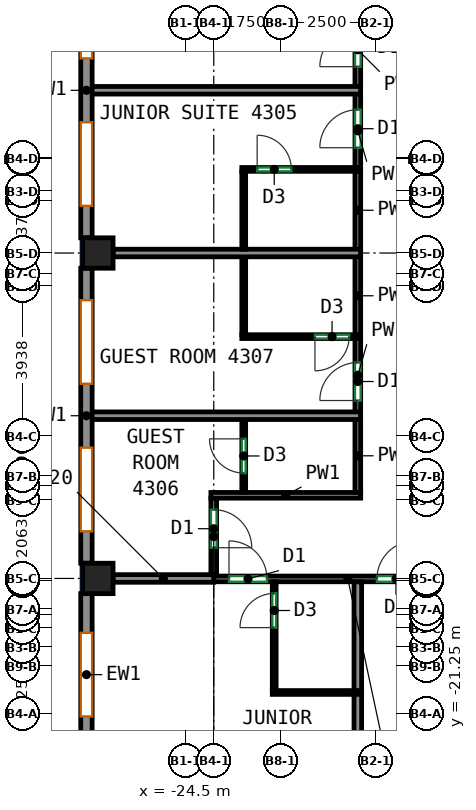
"""IFC4 building model, lengths in metres.
Left out: names, types, materials, properties, quantities, classifications, styles, units other than length and angle.
Written with IfcOpenShell. Run it as: python <this file> out.ifc"""

import sys

from ifc_helpers import new_model, si_unit, direction, frame, frame_2d, origin, origin_2d, place, context, subcontext, project, spatial, rectangle, extrude, source, transform, mapped, element, fill, save


model = new_model("IFC4")
c1 = context("Model", 3, precision=1e-05, world=origin(), true_north=direction((0.0, 1.0)))
c2 = subcontext(c1, "Body", "Model", "MODEL_VIEW")
j1 = project(units=[si_unit("LENGTHUNIT", "METRE"), si_unit("PLANEANGLEUNIT", "RADIAN")], contexts=[c1])
p1 = place(None, origin())
s1 = spatial("IfcSite", under=j1, at=p1, CompositionType="ELEMENT")
p2 = place(p1, origin())
s2 = spatial("IfcBuilding", under=s1, at=p2, CompositionType="ELEMENT")
p3 = place(p2, frame((0.0, 0.0, 182.1)))
s3 = spatial("IfcBuildingStorey", under=s2, at=p3, CompositionType="ELEMENT", Elevation=182.1)
m1 = source(origin(), c2, "Body", "SweptSolid", [
    extrude(rectangle(XDim=0.8, YDim=0.8, at=origin_2d()), origin(), (0.0, 0.0, 1.0), 3.12),
])
for number, where, z_axis, x_axis in (
    (1, (-26.8, -17.688, 0.0), (0.0, 0.0, 1.0), (1.0, 0.0, 0.0)),
    (2, (-26.8, -9.125, 0.0), (0.0, 0.0, 1.0), (1.0, 0.0, 0.0)),
):
    element("IfcColumn", number, at=place(p3, frame(where, z_axis=z_axis, x_axis=x_axis)), inside=s3, PredefinedType="COLUMN", context=c2, shape_type="MappedRepresentation", body=[
        mapped(m1, transform((0.0, 0.0, 0.0))),
    ])
m2 = source(origin(), c2, "Body", "SweptSolid", [
    extrude(rectangle(XDim=7.763, YDim=0.3, at=frame_2d((3.881, 0.0))), origin(), (0.0, 0.0, 1.0), 3.12),
])
p4 = place(p3, frame((-27.1, -0.962, 0.0), z_axis=(0.0, 0.0, 1.0), x_axis=(0.0, -1.0, 0.0)))
e3 = element("IfcWall", 3, at=p4, inside=s3, PredefinedType="SOLIDWALL", context=c2, shape_type="MappedRepresentation", body=[
    mapped(m2, transform((0.0, 0.0, 0.0))),
])
p5 = place(p4, frame((0.841, 0.0, 0.85)))
e4 = element("IfcOpeningElement", 4, at=p5, cuts=e3, PredefinedType="OPENING", context=c2, shape_type="SweptSolid", body=[
    extrude(rectangle(XDim=2.2, YDim=1.95, at=frame_2d((1.1, 0.975))), frame((0.0, 0.16, 0.0), z_axis=(0.0, -1.0, 0.0), x_axis=(1.0, 0.0, 0.0)), (0.0, 0.0, 1.0), 0.32),
])
p6 = place(p4, frame((4.722, 0.0, 0.85)))
e5 = element("IfcOpeningElement", 5, at=p6, cuts=e3, PredefinedType="OPENING", context=c2, shape_type="SweptSolid", body=[
    extrude(rectangle(XDim=2.2, YDim=1.95, at=frame_2d((1.1, 0.975))), frame((0.0, 0.16, 0.0), z_axis=(0.0, -1.0, 0.0), x_axis=(1.0, 0.0, 0.0)), (0.0, 0.0, 1.0), 0.32),
])
p7 = place(p3, frame((-27.1, -9.525, 0.0), z_axis=(0.0, 0.0, 1.0), x_axis=(0.0, -1.0, 0.0)))
e6 = element("IfcWall", 6, at=p7, inside=s3, PredefinedType="SOLIDWALL", context=c2, shape_type="MappedRepresentation", body=[
    mapped(m2, transform((0.0, 0.0, 0.0))),
])
p8 = place(p7, frame((0.841, 0.0, 0.85)))
e7 = element("IfcOpeningElement", 7, at=p8, cuts=e6, PredefinedType="OPENING", context=c2, shape_type="SweptSolid", body=[
    extrude(rectangle(XDim=2.2, YDim=1.95, at=frame_2d((1.1, 0.975))), frame((0.0, 0.16, 0.0), z_axis=(0.0, -1.0, 0.0), x_axis=(1.0, 0.0, 0.0)), (0.0, 0.0, 1.0), 0.32),
])
p9 = place(p7, frame((4.722, 0.0, 0.85)))
e8 = element("IfcOpeningElement", 8, at=p9, cuts=e6, PredefinedType="OPENING", context=c2, shape_type="SweptSolid", body=[
    extrude(rectangle(XDim=2.2, YDim=1.95, at=frame_2d((1.1, 0.975))), frame((0.0, 0.16, 0.0), z_axis=(0.0, -1.0, 0.0), x_axis=(1.0, 0.0, 0.0)), (0.0, 0.0, 1.0), 0.32),
])
m3 = source(origin(), c2, "Body", "SweptSolid", [
    extrude(rectangle(XDim=4.263, YDim=0.3, at=frame_2d((2.131, 0.0))), origin(), (0.0, 0.0, 1.0), 3.12),
])
p10 = place(p3, frame((-27.1, -18.087, 0.0), z_axis=(0.0, 0.0, 1.0), x_axis=(0.0, -1.0, 0.0)))
e9 = element("IfcWall", 9, at=p10, inside=s3, PredefinedType="SOLIDWALL", context=c2, shape_type="MappedRepresentation", body=[
    mapped(m3, transform((0.0, 0.0, 0.0))),
])
p11 = place(p10, frame((1.031, 0.0, 0.85)))
e10 = element("IfcOpeningElement", 10, at=p11, cuts=e9, PredefinedType="OPENING", context=c2, shape_type="SweptSolid", body=[
    extrude(rectangle(XDim=2.2, YDim=1.95, at=frame_2d((1.1, 0.975))), frame((0.0, 0.16, 0.0), z_axis=(0.0, -1.0, 0.0), x_axis=(1.0, 0.0, 0.0)), (0.0, 0.0, 1.0), 0.32),
])
p12 = place(p3, frame((-23.75, -17.7, 0.0), z_axis=(0.0, 0.0, 1.0), x_axis=(1.0, 0.0, 0.0)))
e11 = element("IfcWall", 11, at=p12, inside=s3, PredefinedType="PARTITIONING", context=c2, shape_type="SweptSolid", body=[
    extrude(rectangle(XDim=7.058, YDim=0.15, at=frame_2d((3.529, 0.0))), origin(), (0.0, 0.0, 1.0), 2.52),
])
p13 = place(p12, frame((0.401, 0.0, 0.0)))
e12 = element("IfcOpeningElement", 12, at=p13, cuts=e11, PredefinedType="OPENING", context=c2, shape_type="SweptSolid", body=[
    extrude(rectangle(XDim=1.0, YDim=2.1, at=frame_2d((0.5, 1.05))), frame((0.0, 0.085, 0.0), z_axis=(0.0, -1.0, 0.0), x_axis=(1.0, 0.0, 0.0)), (0.0, 0.0, 1.0), 0.17),
])
p14 = place(p12, frame((4.294, 0.0, 0.0)))
e13 = element("IfcOpeningElement", 13, at=p14, cuts=e11, PredefinedType="OPENING", context=c2, shape_type="SweptSolid", body=[
    extrude(rectangle(XDim=1.0, YDim=2.1, at=frame_2d((0.5, 1.05))), frame((0.0, 0.085, 0.0), z_axis=(0.0, -1.0, 0.0), x_axis=(1.0, 0.0, 0.0)), (0.0, 0.0, 1.0), 0.17),
])
p15 = place(p3, frame((-23.75, -15.575, 0.0), z_axis=(0.0, 0.0, 1.0), x_axis=(0.0, -1.0, 0.0)))
e14 = element("IfcWall", 14, at=p15, inside=s3, PredefinedType="PARTITIONING", context=c2, shape_type="SweptSolid", body=[
    extrude(rectangle(XDim=2.023, YDim=0.15, at=frame_2d((1.011, 0.0))), origin(), (0.0, 0.0, 1.0), 2.52),
])
p16 = place(p15, frame((0.304, 0.0, 0.0)))
e15 = element("IfcOpeningElement", 15, at=p16, cuts=e14, PredefinedType="OPENING", context=c2, shape_type="SweptSolid", body=[
    extrude(rectangle(XDim=1.0, YDim=2.1, at=frame_2d((0.5, 1.05))), frame((0.0, 0.085, 0.0), z_axis=(0.0, -1.0, 0.0), x_axis=(1.0, 0.0, 0.0)), (0.0, 0.0, 1.0), 0.17),
])
p17 = place(p3, frame((-23.825, -15.5, 0.0), z_axis=(0.0, 0.0, 1.0), x_axis=(1.0, 0.0, 0.0)))
e16 = element("IfcWall", 16, at=p17, inside=s3, PredefinedType="PARTITIONING", context=c2, shape_type="SweptSolid", body=[
    extrude(rectangle(XDim=3.941, YDim=0.15, at=frame_2d((1.97, 0.0))), origin(), (0.0, 0.0, 1.0), 3.12),
])
p18 = place(p3, frame((-19.959, -15.425, 0.0), z_axis=(0.0, 0.0, 1.0), x_axis=(0.0, 1.0, 0.0)))
e17 = element("IfcWall", 17, at=p18, inside=s3, PredefinedType="PARTITIONING", context=c2, shape_type="SweptSolid", body=[
    extrude(rectangle(XDim=1.929, YDim=0.15, at=frame_2d((0.964, 0.0))), origin(), (0.0, 0.0, 1.0), 3.12),
])
p19 = place(p3, frame((-19.959, -13.316, 0.0), z_axis=(0.0, 0.0, 1.0), x_axis=(0.0, 1.0, 0.0)))
e18 = element("IfcWall", 18, at=p19, inside=s3, PredefinedType="PARTITIONING", context=c2, shape_type="SweptSolid", body=[
    extrude(rectangle(XDim=1.951, YDim=0.15, at=frame_2d((0.976, 0.0))), origin(), (0.0, 0.0, 1.0), 3.12),
])
p20 = place(p19, frame((0.31, 0.0, 0.0)))
e19 = element("IfcOpeningElement", 19, at=p20, cuts=e18, PredefinedType="OPENING", context=c2, shape_type="SweptSolid", body=[
    extrude(rectangle(XDim=1.0, YDim=2.1, at=frame_2d((0.5, 1.05))), frame((0.0, 0.085, 0.0), z_axis=(0.0, -1.0, 0.0), x_axis=(1.0, 0.0, 0.0)), (0.0, 0.0, 1.0), 0.17),
])
p21 = place(p3, frame((-19.959, -11.285, 0.0), z_axis=(0.0, 0.0, 1.0), x_axis=(0.0, 1.0, 0.0)))
e20 = element("IfcWall", 20, at=p21, inside=s3, PredefinedType="PARTITIONING", context=c2, shape_type="SweptSolid", body=[
    extrude(rectangle(XDim=2.07, YDim=0.15, at=frame_2d((1.035, 0.0))), origin(), (0.0, 0.0, 1.0), 3.12),
])
p22 = place(p3, frame((-19.959, -6.885, 0.0), z_axis=(0.0, 0.0, 1.0), x_axis=(0.0, 1.0, 0.0)))
e21 = element("IfcWall", 21, at=p22, inside=s3, PredefinedType="PARTITIONING", context=c2, shape_type="SweptSolid", body=[
    extrude(rectangle(XDim=1.952, YDim=0.15, at=frame_2d((0.976, 0.0))), origin(), (0.0, 0.0, 1.0), 3.12),
])
p23 = place(p22, frame((0.531, 0.0, 0.0)))
e22 = element("IfcOpeningElement", 22, at=p23, cuts=e21, PredefinedType="OPENING", context=c2, shape_type="SweptSolid", body=[
    extrude(rectangle(XDim=1.0, YDim=2.1, at=frame_2d((0.5, 1.05))), frame((0.0, 0.085, 0.0), z_axis=(0.0, -1.0, 0.0), x_axis=(1.0, 0.0, 0.0)), (0.0, 0.0, 1.0), 0.17),
])
p24 = place(p3, frame((-19.959, -9.035, 0.0), z_axis=(0.0, 0.0, 1.0), x_axis=(0.0, 1.0, 0.0)))
e23 = element("IfcWall", 23, at=p24, inside=s3, PredefinedType="PARTITIONING", context=c2, shape_type="SweptSolid", body=[
    extrude(rectangle(XDim=2.07, YDim=0.15, at=frame_2d((1.035, 0.0))), origin(), (0.0, 0.0, 1.0), 3.12),
])
p25 = place(p3, frame((-19.959, -4.753, 0.0), z_axis=(0.0, 0.0, 1.0), x_axis=(0.0, 1.0, 0.0)))
e24 = element("IfcWall", 24, at=p25, inside=s3, PredefinedType="PARTITIONING", context=c2, shape_type="SweptSolid", body=[
    extrude(rectangle(XDim=1.951, YDim=0.15, at=frame_2d((0.976, 0.0))), origin(), (0.0, 0.0, 1.0), 3.12),
])
p26 = place(p25, frame((0.531, 0.0, 0.0)))
e25 = element("IfcOpeningElement", 25, at=p26, cuts=e24, PredefinedType="OPENING", context=c2, shape_type="SweptSolid", body=[
    extrude(rectangle(XDim=1.0, YDim=2.1, at=frame_2d((0.5, 1.05))), frame((0.0, 0.085, 0.0), z_axis=(0.0, -1.0, 0.0), x_axis=(1.0, 0.0, 0.0)), (0.0, 0.0, 1.0), 0.17),
])
p27 = place(p3, frame((-22.159, -20.638, 0.0), z_axis=(0.0, 0.0, 1.0), x_axis=(0.0, 1.0, 0.0)))
e26 = element("IfcWall", 26, at=p27, inside=s3, PredefinedType="PARTITIONING", context=c2, shape_type="SweptSolid", body=[
    extrude(rectangle(XDim=2.861, YDim=0.1, at=frame_2d((1.43, 0.0))), origin(), (0.0, 0.0, 1.0), 3.12),
])
p28 = place(p27, frame((1.657, 0.0, 0.0)))
e27 = element("IfcOpeningElement", 27, at=p28, cuts=e26, PredefinedType="OPENING", context=c2, shape_type="SweptSolid", body=[
    extrude(rectangle(XDim=0.9, YDim=2.1, at=frame_2d((0.45, 1.05))), frame((0.0, 0.06, 0.0), z_axis=(0.0, -1.0, 0.0), x_axis=(1.0, 0.0, 0.0)), (0.0, 0.0, 1.0), 0.12),
])
p29 = place(p3, frame((-22.209, -20.688, 0.0), z_axis=(0.0, 0.0, 1.0), x_axis=(1.0, 0.0, 0.0)))
e28 = element("IfcWall", 28, at=p29, inside=s3, PredefinedType="PARTITIONING", context=c2, shape_type="SweptSolid", body=[
    extrude(rectangle(XDim=2.35, YDim=0.1, at=frame_2d((1.175, 0.0))), origin(), (0.0, 0.0, 1.0), 3.12),
])
p30 = place(p3, frame((-19.959, -26.0, 0.0), z_axis=(0.0, 0.0, 1.0), x_axis=(0.0, 1.0, 0.0)))
e29 = element("IfcWall", 29, at=p30, inside=s3, PredefinedType="PARTITIONING", context=c2, shape_type="SweptSolid", body=[
    extrude(rectangle(XDim=5.262, YDim=0.2, at=frame_2d((2.631, 0.0))), origin(), (0.0, 0.0, 1.0), 3.12),
])
p31 = place(p3, frame((-26.4, -17.688, 0.0), z_axis=(0.0, 0.0, 1.0), x_axis=(1.0, 0.0, 0.0)))
e30 = element("IfcWall", 30, at=p31, inside=s3, PredefinedType="PARTITIONING", context=c2, shape_type="SweptSolid", body=[
    extrude(rectangle(XDim=2.648, YDim=0.2, at=frame_2d((1.324, 0.0))), origin(), (0.0, 0.0, 1.0), 2.52),
])
p32 = place(p3, frame((-19.959, -20.638, 0.0), z_axis=(0.0, 0.0, 1.0), x_axis=(0.0, 1.0, 0.0)))
e31 = element("IfcWall", 31, at=p32, inside=s3, PredefinedType="PARTITIONING", context=c2, shape_type="SweptSolid", body=[
    extrude(rectangle(XDim=2.861, YDim=0.2, at=frame_2d((1.43, 0.0))), origin(), (0.0, 0.0, 1.0), 3.12),
])
p33 = place(p3, frame((-22.961, -15.423, 0.0), z_axis=(0.0, 0.0, 1.0), x_axis=(0.0, 1.0, 0.0)))
e32 = element("IfcWall", 32, at=p33, inside=s3, PredefinedType="PARTITIONING", context=c2, shape_type="SweptSolid", body=[
    extrude(rectangle(XDim=1.917, YDim=0.1, at=frame_2d((0.958, 0.0))), origin(), (0.0, 0.0, 1.0), 3.12),
])
p34 = place(p33, frame((0.508, 0.0, 0.0)))
e33 = element("IfcOpeningElement", 33, at=p34, cuts=e32, PredefinedType="OPENING", context=c2, shape_type="SweptSolid", body=[
    extrude(rectangle(XDim=0.9, YDim=2.1, at=frame_2d((0.45, 1.05))), frame((0.0, 0.06, 0.0), z_axis=(0.0, -1.0, 0.0), x_axis=(1.0, 0.0, 0.0)), (0.0, 0.0, 1.0), 0.12),
])
p35 = place(p3, frame((-27.0, -13.406, 0.0), z_axis=(0.0, 0.0, 1.0), x_axis=(1.0, 0.0, 0.0)))
e34 = element("IfcWall", 34, at=p35, inside=s3, PredefinedType="PARTITIONING", context=c2, shape_type="SweptSolid", body=[
    extrude(rectangle(XDim=7.114, YDim=0.2, at=frame_2d((3.557, 0.0))), origin(), (0.0, 0.0, 1.0), 3.12),
])
p36 = place(p3, frame((-19.886, -11.325, 0.0), z_axis=(0.0, 0.0, 1.0), x_axis=(-1.0, 0.0, 0.0)))
e35 = element("IfcWall", 35, at=p36, inside=s3, PredefinedType="PARTITIONING", context=c2, shape_type="SweptSolid", body=[
    extrude(rectangle(XDim=3.125, YDim=0.1, at=frame_2d((1.562, 0.0))), origin(), (0.0, 0.0, 1.0), 3.12),
])
p37 = place(p36, frame((0.301, 0.0, 0.0)))
e36 = element("IfcOpeningElement", 36, at=p37, cuts=e35, PredefinedType="OPENING", context=c2, shape_type="SweptSolid", body=[
    extrude(rectangle(XDim=0.9, YDim=2.1, at=frame_2d((0.45, 1.05))), frame((0.0, 0.06, 0.0), z_axis=(0.0, -1.0, 0.0), x_axis=(1.0, 0.0, 0.0)), (0.0, 0.0, 1.0), 0.12),
])
p38 = place(p3, frame((-22.961, -11.275, 0.0), z_axis=(0.0, 0.0, 1.0), x_axis=(0.0, 1.0, 0.0)))
e37 = element("IfcWall", 37, at=p38, inside=s3, PredefinedType="PARTITIONING", context=c2, shape_type="SweptSolid", body=[
    extrude(rectangle(XDim=2.05, YDim=0.1, at=frame_2d((1.025, 0.0))), origin(), (0.0, 0.0, 1.0), 3.12),
])
p39 = place(p3, frame((-26.4, -9.125, 0.0), z_axis=(0.0, 0.0, 1.0), x_axis=(1.0, 0.0, 0.0)))
e38 = element("IfcWall", 38, at=p39, inside=s3, PredefinedType="PARTITIONING", context=c2, shape_type="SweptSolid", body=[
    extrude(rectangle(XDim=6.514, YDim=0.2, at=frame_2d((3.257, 0.0))), origin(), (0.0, 0.0, 1.0), 3.12),
])
p40 = place(p3, frame((-23.011, -6.925, 0.0), z_axis=(0.0, 0.0, 1.0), x_axis=(1.0, 0.0, 0.0)))
e39 = element("IfcWall", 39, at=p40, inside=s3, PredefinedType="PARTITIONING", context=c2, shape_type="SweptSolid", body=[
    extrude(rectangle(XDim=3.125, YDim=0.1, at=frame_2d((1.562, 0.0))), origin(), (0.0, 0.0, 1.0), 3.12),
])
p41 = place(p40, frame((0.403, 0.0, 0.0)))
e40 = element("IfcOpeningElement", 40, at=p41, cuts=e39, PredefinedType="OPENING", context=c2, shape_type="SweptSolid", body=[
    extrude(rectangle(XDim=0.9, YDim=2.1, at=frame_2d((0.45, 1.05))), frame((0.0, 0.06, 0.0), z_axis=(0.0, -1.0, 0.0), x_axis=(1.0, 0.0, 0.0)), (0.0, 0.0, 1.0), 0.12),
])
p42 = place(p3, frame((-22.961, -9.025, 0.0), z_axis=(0.0, 0.0, 1.0), x_axis=(0.0, 1.0, 0.0)))
e41 = element("IfcWall", 41, at=p42, inside=s3, PredefinedType="PARTITIONING", context=c2, shape_type="SweptSolid", body=[
    extrude(rectangle(XDim=2.05, YDim=0.1, at=frame_2d((1.025, 0.0))), origin(), (0.0, 0.0, 1.0), 3.12),
])
p43 = place(p3, frame((-27.0, -4.843, 0.0), z_axis=(0.0, 0.0, 1.0), x_axis=(1.0, 0.0, 0.0)))
e42 = element("IfcWall", 42, at=p43, inside=s3, PredefinedType="PARTITIONING", context=c2, shape_type="SweptSolid", body=[
    extrude(rectangle(XDim=7.114, YDim=0.2, at=frame_2d((3.557, 0.0))), origin(), (0.0, 0.0, 1.0), 3.12),
])
p44 = place(p5, origin())
e43 = element("IfcWindow", 43, at=p44, inside=s3, PartitioningType="SINGLE_PANEL", PredefinedType="WINDOW", context=c2, shape_type="SweptSolid", body=[
    extrude(rectangle(XDim=2.2, YDim=1.95, at=frame_2d((1.1, 0.975))), frame((0.0, 0.03, 0.0), z_axis=(0.0, -1.0, 0.0), x_axis=(1.0, 0.0, 0.0)), (0.0, 0.0, 1.0), 0.06),
])
fill(e4, e43)
p45 = place(p6, origin())
e44 = element("IfcWindow", 44, at=p45, inside=s3, PartitioningType="SINGLE_PANEL", PredefinedType="WINDOW", context=c2, shape_type="SweptSolid", body=[
    extrude(rectangle(XDim=2.2, YDim=1.95, at=frame_2d((1.1, 0.975))), frame((0.0, 0.03, 0.0), z_axis=(0.0, -1.0, 0.0), x_axis=(1.0, 0.0, 0.0)), (0.0, 0.0, 1.0), 0.06),
])
fill(e5, e44)
p46 = place(p8, origin())
e45 = element("IfcWindow", 45, at=p46, inside=s3, PartitioningType="SINGLE_PANEL", PredefinedType="WINDOW", context=c2, shape_type="SweptSolid", body=[
    extrude(rectangle(XDim=2.2, YDim=1.95, at=frame_2d((1.1, 0.975))), frame((0.0, 0.03, 0.0), z_axis=(0.0, -1.0, 0.0), x_axis=(1.0, 0.0, 0.0)), (0.0, 0.0, 1.0), 0.06),
])
fill(e7, e45)
p47 = place(p9, origin())
e46 = element("IfcWindow", 46, at=p47, inside=s3, PartitioningType="SINGLE_PANEL", PredefinedType="WINDOW", context=c2, shape_type="SweptSolid", body=[
    extrude(rectangle(XDim=2.2, YDim=1.95, at=frame_2d((1.1, 0.975))), frame((0.0, 0.03, 0.0), z_axis=(0.0, -1.0, 0.0), x_axis=(1.0, 0.0, 0.0)), (0.0, 0.0, 1.0), 0.06),
])
fill(e8, e46)
p48 = place(p11, origin())
e47 = element("IfcWindow", 47, at=p48, inside=s3, PartitioningType="SINGLE_PANEL", PredefinedType="WINDOW", context=c2, shape_type="SweptSolid", body=[
    extrude(rectangle(XDim=2.2, YDim=1.95, at=frame_2d((1.1, 0.975))), frame((0.0, 0.03, 0.0), z_axis=(0.0, -1.0, 0.0), x_axis=(1.0, 0.0, 0.0)), (0.0, 0.0, 1.0), 0.06),
])
fill(e10, e47)
p49 = place(p28, origin())
e48 = element("IfcDoor", 48, at=p49, inside=s3, OperationType="SINGLE_SWING_LEFT", PredefinedType="DOOR", context=c2, shape_type="SweptSolid", body=[
    extrude(rectangle(XDim=0.9, YDim=2.1, at=frame_2d((0.45, 1.05))), frame((0.0, 0.025, 0.0), z_axis=(0.0, -1.0, 0.0), x_axis=(1.0, 0.0, 0.0)), (0.0, 0.0, 1.0), 0.05),
])
fill(e27, e48)
p50 = place(p13, origin())
e49 = element("IfcDoor", 49, at=p50, inside=s3, OperationType="SINGLE_SWING_LEFT", PredefinedType="DOOR", context=c2, shape_type="SweptSolid", body=[
    extrude(rectangle(XDim=1.0, YDim=2.1, at=frame_2d((0.5, 1.05))), frame((0.0, 0.025, 0.0), z_axis=(0.0, -1.0, 0.0), x_axis=(1.0, 0.0, 0.0)), (0.0, 0.0, 1.0), 0.05),
])
fill(e12, e49)
p51 = place(p14, origin())
e50 = element("IfcDoor", 50, at=p51, inside=s3, OperationType="SINGLE_SWING_RIGHT", PredefinedType="DOOR", context=c2, shape_type="SweptSolid", body=[
    extrude(rectangle(XDim=1.0, YDim=2.1, at=frame_2d((0.5, 1.05))), frame((0.0, 0.025, 0.0), z_axis=(0.0, -1.0, 0.0), x_axis=(1.0, 0.0, 0.0)), (0.0, 0.0, 1.0), 0.05),
])
fill(e13, e50)
p52 = place(p16, origin())
e51 = element("IfcDoor", 51, at=p52, inside=s3, OperationType="SINGLE_SWING_RIGHT", PredefinedType="DOOR", context=c2, shape_type="SweptSolid", body=[
    extrude(rectangle(XDim=1.0, YDim=2.1, at=frame_2d((0.5, 1.05))), frame((0.0, 0.025, 0.0), z_axis=(0.0, -1.0, 0.0), x_axis=(1.0, 0.0, 0.0)), (0.0, 0.0, 1.0), 0.05),
])
fill(e15, e51)
p53 = place(p34, origin())
e52 = element("IfcDoor", 52, at=p53, inside=s3, OperationType="SINGLE_SWING_RIGHT", PredefinedType="DOOR", context=c2, shape_type="SweptSolid", body=[
    extrude(rectangle(XDim=0.9, YDim=2.1, at=frame_2d((0.45, 1.05))), frame((0.0, 0.025, 0.0), z_axis=(0.0, -1.0, 0.0), x_axis=(1.0, 0.0, 0.0)), (0.0, 0.0, 1.0), 0.05),
])
fill(e33, e52)
p54 = place(p20, origin())
e53 = element("IfcDoor", 53, at=p54, inside=s3, OperationType="SINGLE_SWING_LEFT", PredefinedType="DOOR", context=c2, shape_type="SweptSolid", body=[
    extrude(rectangle(XDim=1.0, YDim=2.1, at=frame_2d((0.5, 1.05))), frame((0.0, 0.025, 0.0), z_axis=(0.0, -1.0, 0.0), x_axis=(1.0, 0.0, 0.0)), (0.0, 0.0, 1.0), 0.05),
])
fill(e19, e53)
p55 = place(p37, origin())
e54 = element("IfcDoor", 54, at=p55, inside=s3, OperationType="SINGLE_SWING_RIGHT", PredefinedType="DOOR", context=c2, shape_type="SweptSolid", body=[
    extrude(rectangle(XDim=0.9, YDim=2.1, at=frame_2d((0.45, 1.05))), frame((0.0, 0.025, 0.0), z_axis=(0.0, -1.0, 0.0), x_axis=(1.0, 0.0, 0.0)), (0.0, 0.0, 1.0), 0.05),
])
fill(e36, e54)
p56 = place(p41, origin())
e55 = element("IfcDoor", 55, at=p56, inside=s3, OperationType="SINGLE_SWING_LEFT", PredefinedType="DOOR", context=c2, shape_type="SweptSolid", body=[
    extrude(rectangle(XDim=0.9, YDim=2.1, at=frame_2d((0.45, 1.05))), frame((0.0, 0.025, 0.0), z_axis=(0.0, -1.0, 0.0), x_axis=(1.0, 0.0, 0.0)), (0.0, 0.0, 1.0), 0.05),
])
fill(e40, e55)
p57 = place(p23, origin())
e56 = element("IfcDoor", 56, at=p57, inside=s3, OperationType="SINGLE_SWING_LEFT", PredefinedType="DOOR", context=c2, shape_type="SweptSolid", body=[
    extrude(rectangle(XDim=1.0, YDim=2.1, at=frame_2d((0.5, 1.05))), frame((0.0, 0.025, 0.0), z_axis=(0.0, -1.0, 0.0), x_axis=(1.0, 0.0, 0.0)), (0.0, 0.0, 1.0), 0.05),
])
fill(e22, e56)
p58 = place(p26, origin())
e57 = element("IfcDoor", 57, at=p58, inside=s3, OperationType="SINGLE_SWING_LEFT", PredefinedType="DOOR", context=c2, shape_type="SweptSolid", body=[
    extrude(rectangle(XDim=1.0, YDim=2.1, at=frame_2d((0.5, 1.05))), frame((0.0, 0.025, 0.0), z_axis=(0.0, -1.0, 0.0), x_axis=(1.0, 0.0, 0.0)), (0.0, 0.0, 1.0), 0.05),
])
fill(e25, e57)
save(model, sys.argv[1])
